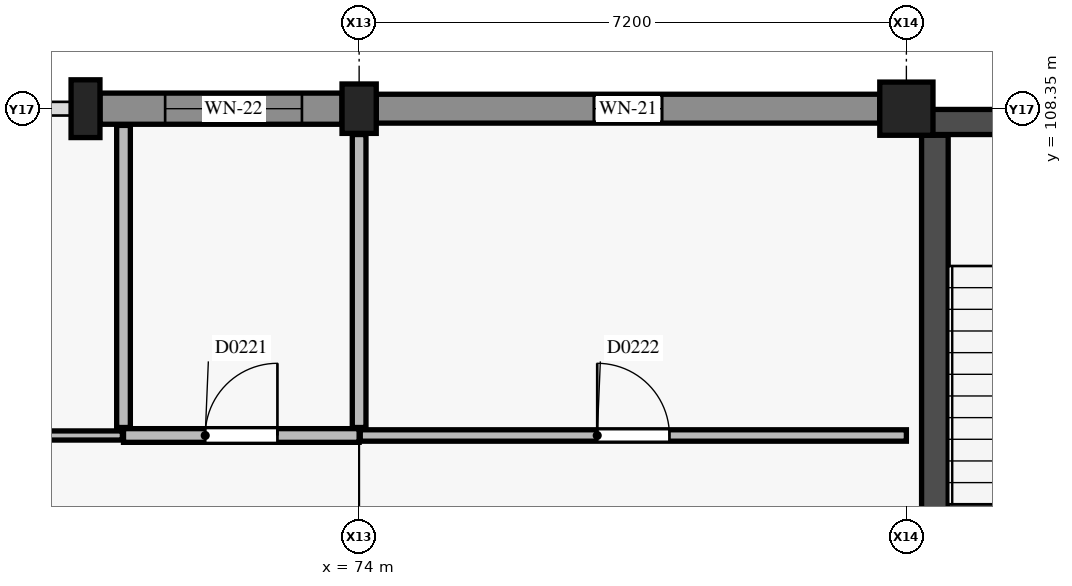
"""IFC4 building model, lengths in metres.
Left out: names, types, materials, properties, quantities, classifications, styles, units other than length and angle.
Written with IfcOpenShell. Run it as: python <this file> out.ifc"""

import sys

from ifc_helpers import new_model, si_unit, direction, frame, frame_2d, origin, origin_2d, place, context, subcontext, project, spatial, rectangle, circle, extrude, element, fill, save


model = new_model("IFC4")
c1 = context("Model", 3, precision=1e-05, world=origin(), true_north=direction((0.0, 1.0)))
c2 = subcontext(c1, "Body", "Model", "MODEL_VIEW")
j1 = project(units=[si_unit("LENGTHUNIT", "METRE"), si_unit("PLANEANGLEUNIT", "RADIAN")], contexts=[c1])
p1 = place(None, origin())
s1 = spatial("IfcSite", under=j1, at=p1, CompositionType="ELEMENT")
p2 = place(p1, origin())
s2 = spatial("IfcBuilding", under=s1, at=p2, CompositionType="ELEMENT")
p3 = place(p2, frame((0.0, 0.0, 4.8)))
s3 = spatial("IfcBuildingStorey", under=s2, at=p3, CompositionType="ELEMENT", Elevation=4.8)
p4 = place(p3, frame((74.0, 108.35, 0.0), z_axis=(0.0, 0.0, 1.0), x_axis=(1.0, 0.0, 0.0)))
e1 = element("IfcColumn", 1, at=p4, inside=s3, PredefinedType="COLUMN", context=c2, shape_type="SweptSolid", body=[
    extrude(rectangle(XDim=0.45, YDim=0.65, at=origin_2d()), origin(), (0.0, 0.0, 1.0), 4.2),
])
p5 = place(p3, frame((81.2, 108.35, 0.0), z_axis=(0.0, 0.0, 1.0), x_axis=(1.0, 0.0, 0.0)))
e2 = element("IfcColumn", 2, at=p5, inside=s3, PredefinedType="COLUMN", context=c2, shape_type="SweptSolid", body=[
    extrude(circle(Radius=0.35, at=origin_2d()), origin(), (0.0, 0.0, 1.0), 4.2),
])
p6 = place(p3, frame((70.4, 108.35, 0.0), z_axis=(0.0, 0.0, 1.0), x_axis=(1.0, 0.0, 0.0)))
e3 = element("IfcColumn", 3, at=p6, inside=s3, PredefinedType="PILASTER", context=c2, shape_type="SweptSolid", body=[
    extrude(rectangle(XDim=0.38, YDim=0.76, at=origin_2d()), origin(), (0.0, 0.0, 1.0), 4.2),
])
p7 = place(p3, frame((81.4, 108.175, 0.0), z_axis=(0.0, 0.0, 1.0), x_axis=(1.0, 0.0, 0.0)))
e4 = element("IfcWall", 4, at=p7, inside=s3, PredefinedType="SHEAR", context=c2, shape_type="SweptSolid", body=[
    extrude(rectangle(XDim=4.3, YDim=0.33, at=frame_2d((2.15, 0.0))), origin(), (0.0, 0.0, 1.0), 3.95),
])
p8 = place(p3, frame((81.575, 100.7, 0.0), z_axis=(0.0, 0.0, 1.0), x_axis=(0.0, 1.0, 0.0)))
e5 = element("IfcWall", 5, at=p8, inside=s3, PredefinedType="SHEAR", context=c2, shape_type="SweptSolid", body=[
    extrude(rectangle(XDim=7.3, YDim=0.35, at=frame_2d((3.65, 0.0))), origin(), (0.0, 0.0, 1.0), 3.95),
])
p9 = place(p3, frame((70.59, 108.35, 0.0), z_axis=(0.0, 0.0, 1.0), x_axis=(1.0, 0.0, 0.0)))
e6 = element("IfcWall", 6, at=p9, inside=s3, PredefinedType="USERDEFINED", context=c2, shape_type="SweptSolid", body=[
    extrude(rectangle(XDim=3.185, YDim=0.41, at=frame_2d((1.592, 0.0))), origin(), (0.0, 0.0, 1.0), 3.13),
])
p10 = place(p9, frame((0.857, 0.0, 0.9)))
e7 = element("IfcOpeningElement", 7, at=p10, cuts=e6, PredefinedType="OPENING", context=c2, shape_type="SweptSolid", body=[
    extrude(rectangle(XDim=1.8, YDim=0.9, at=frame_2d((0.9, 0.45))), frame((0.0, 0.215, 0.0), z_axis=(0.0, -1.0, 0.0), x_axis=(1.0, 0.0, 0.0)), (0.0, 0.0, 1.0), 0.43),
])
p11 = place(p3, frame((74.225, 108.35, 0.0), z_axis=(0.0, 0.0, 1.0), x_axis=(1.0, 0.0, 0.0)))
e8 = element("IfcWall", 8, at=p11, inside=s3, PredefinedType="USERDEFINED", context=c2, shape_type="SweptSolid", body=[
    extrude(rectangle(XDim=6.625, YDim=0.38, at=frame_2d((3.312, 0.0))), origin(), (0.0, 0.0, 1.0), 3.13),
])
p12 = place(p11, frame((2.863, 0.0, 0.95)))
e9 = element("IfcOpeningElement", 9, at=p12, cuts=e8, PredefinedType="OPENING", context=c2, shape_type="SweptSolid", body=[
    extrude(rectangle(XDim=0.9, YDim=1.2, at=frame_2d((0.45, 0.6))), frame((0.0, 0.2, 0.0), z_axis=(0.0, -1.0, 0.0), x_axis=(1.0, 0.0, 0.0)), (0.0, 0.0, 1.0), 0.4),
])
p13 = place(p3, frame((70.9, 104.05, 0.0), z_axis=(0.0, 0.0, 1.0), x_axis=(1.0, 0.0, 0.0)))
e10 = element("IfcWall", 10, at=p13, inside=s3, PredefinedType="PLUMBINGWALL", context=c2, shape_type="SweptSolid", body=[
    extrude(rectangle(XDim=3.1, YDim=0.18, at=frame_2d((1.55, 0.0))), origin(), (0.0, 0.0, 1.0), 3.355),
])
p14 = place(p13, frame((1.075, 0.0, 0.0)))
e11 = element("IfcOpeningElement", 11, at=p14, cuts=e10, PredefinedType="OPENING", context=c2, shape_type="SweptSolid", body=[
    extrude(rectangle(XDim=0.95, YDim=2.1, at=frame_2d((0.475, 1.05))), frame((0.0, 0.1, 0.0), z_axis=(0.0, -1.0, 0.0), x_axis=(1.0, 0.0, 0.0)), (0.0, 0.0, 1.0), 0.2),
])
p15 = place(p3, frame((74.015, 104.05, 0.0), z_axis=(0.0, 0.0, 1.0), x_axis=(1.0, 0.0, 0.0)))
e12 = element("IfcWall", 12, at=p15, inside=s3, PredefinedType="PARTITIONING", context=c2, shape_type="SweptSolid", body=[
    extrude(rectangle(XDim=7.185, YDim=0.15, at=frame_2d((3.593, 0.0))), origin(), (0.0, 0.0, 1.0), 3.215),
])
p16 = place(p15, frame((3.117, 0.0, 0.0)))
e13 = element("IfcOpeningElement", 13, at=p16, cuts=e12, PredefinedType="OPENING", context=c2, shape_type="SweptSolid", body=[
    extrude(rectangle(XDim=0.95, YDim=2.1, at=frame_2d((0.475, 1.05))), frame((0.0, 0.085, 0.0), z_axis=(0.0, -1.0, 0.0), x_axis=(1.0, 0.0, 0.0)), (0.0, 0.0, 1.0), 0.17),
])
p17 = place(p3, frame((66.8, 104.05, 0.0), z_axis=(0.0, 0.0, 1.0), x_axis=(1.0, 0.0, 0.0)))
e14 = element("IfcWall", 14, at=p17, inside=s3, PredefinedType="PARTITIONING", context=c2, shape_type="SweptSolid", body=[
    extrude(rectangle(XDim=4.085, YDim=0.12, at=frame_2d((2.042, 0.0))), origin(), (0.0, 0.0, 1.0), 3.215),
])
p18 = place(p17, frame((1.242, 0.0, 0.0)))
e15 = element("IfcOpeningElement", 15, at=p18, cuts=e14, PredefinedType="OPENING", context=c2, shape_type="SweptSolid", body=[
    extrude(rectangle(XDim=1.6, YDim=2.25, at=frame_2d((0.8, 1.125))), frame((0.0, 0.07, 0.0), z_axis=(0.0, -1.0, 0.0), x_axis=(1.0, 0.0, 0.0)), (0.0, 0.0, 1.0), 0.14),
])
p19 = place(p3, frame((70.9, 104.155, 0.0), z_axis=(0.0, 0.0, 1.0), x_axis=(0.0, 1.0, 0.0)))
e16 = element("IfcWall", 16, at=p19, inside=s3, PredefinedType="PLUMBINGWALL", context=c2, shape_type="SweptSolid", body=[
    extrude(rectangle(XDim=3.975, YDim=0.18, at=frame_2d((1.987, 0.0))), origin(), (0.0, 0.0, 1.0), 3.515),
])
p20 = place(p3, frame((74.0, 104.155, 0.0), z_axis=(0.0, 0.0, 1.0), x_axis=(0.0, 1.0, 0.0)))
e17 = element("IfcWall", 17, at=p20, inside=s3, PredefinedType="PLUMBINGWALL", context=c2, shape_type="SweptSolid", body=[
    extrude(rectangle(XDim=3.855, YDim=0.18, at=frame_2d((1.927, 0.0))), origin(), (0.0, 0.0, 1.0), 3.355),
])
p21 = place(p10, origin())
e18 = element("IfcWindow", 18, at=p21, inside=s3, PartitioningType="SINGLE_PANEL", PredefinedType="WINDOW", context=c2, shape_type="SweptSolid", body=[
    extrude(rectangle(XDim=1.8, YDim=0.9, at=frame_2d((0.9, 0.45))), frame((0.0, 0.03, 0.0), z_axis=(0.0, -1.0, 0.0), x_axis=(1.0, 0.0, 0.0)), (0.0, 0.0, 1.0), 0.06),
])
fill(e7, e18)
p22 = place(p12, origin())
e19 = element("IfcWindow", 19, at=p22, inside=s3, PartitioningType="SINGLE_PANEL", PredefinedType="WINDOW", context=c2, shape_type="SweptSolid", body=[
    extrude(rectangle(XDim=0.9, YDim=1.2, at=frame_2d((0.45, 0.6))), frame((0.0, 0.03, 0.0), z_axis=(0.0, -1.0, 0.0), x_axis=(1.0, 0.0, 0.0)), (0.0, 0.0, 1.0), 0.06),
])
fill(e9, e19)
p23 = place(p14, origin())
e20 = element("IfcDoor", 20, at=p23, inside=s3, OperationType="SINGLE_SWING_RIGHT", PredefinedType="DOOR", context=c2, shape_type="SweptSolid", body=[
    extrude(rectangle(XDim=0.95, YDim=2.1, at=frame_2d((0.475, 1.05))), frame((0.0, 0.025, 0.0), z_axis=(0.0, -1.0, 0.0), x_axis=(1.0, 0.0, 0.0)), (0.0, 0.0, 1.0), 0.05),
])
fill(e11, e20)
p24 = place(p16, origin())
e21 = element("IfcDoor", 21, at=p24, inside=s3, OperationType="SINGLE_SWING_LEFT", PredefinedType="DOOR", context=c2, shape_type="SweptSolid", body=[
    extrude(rectangle(XDim=0.95, YDim=2.1, at=frame_2d((0.475, 1.05))), frame((0.0, 0.025, 0.0), z_axis=(0.0, -1.0, 0.0), x_axis=(1.0, 0.0, 0.0)), (0.0, 0.0, 1.0), 0.05),
])
fill(e13, e21)
save(model, sys.argv[1])
